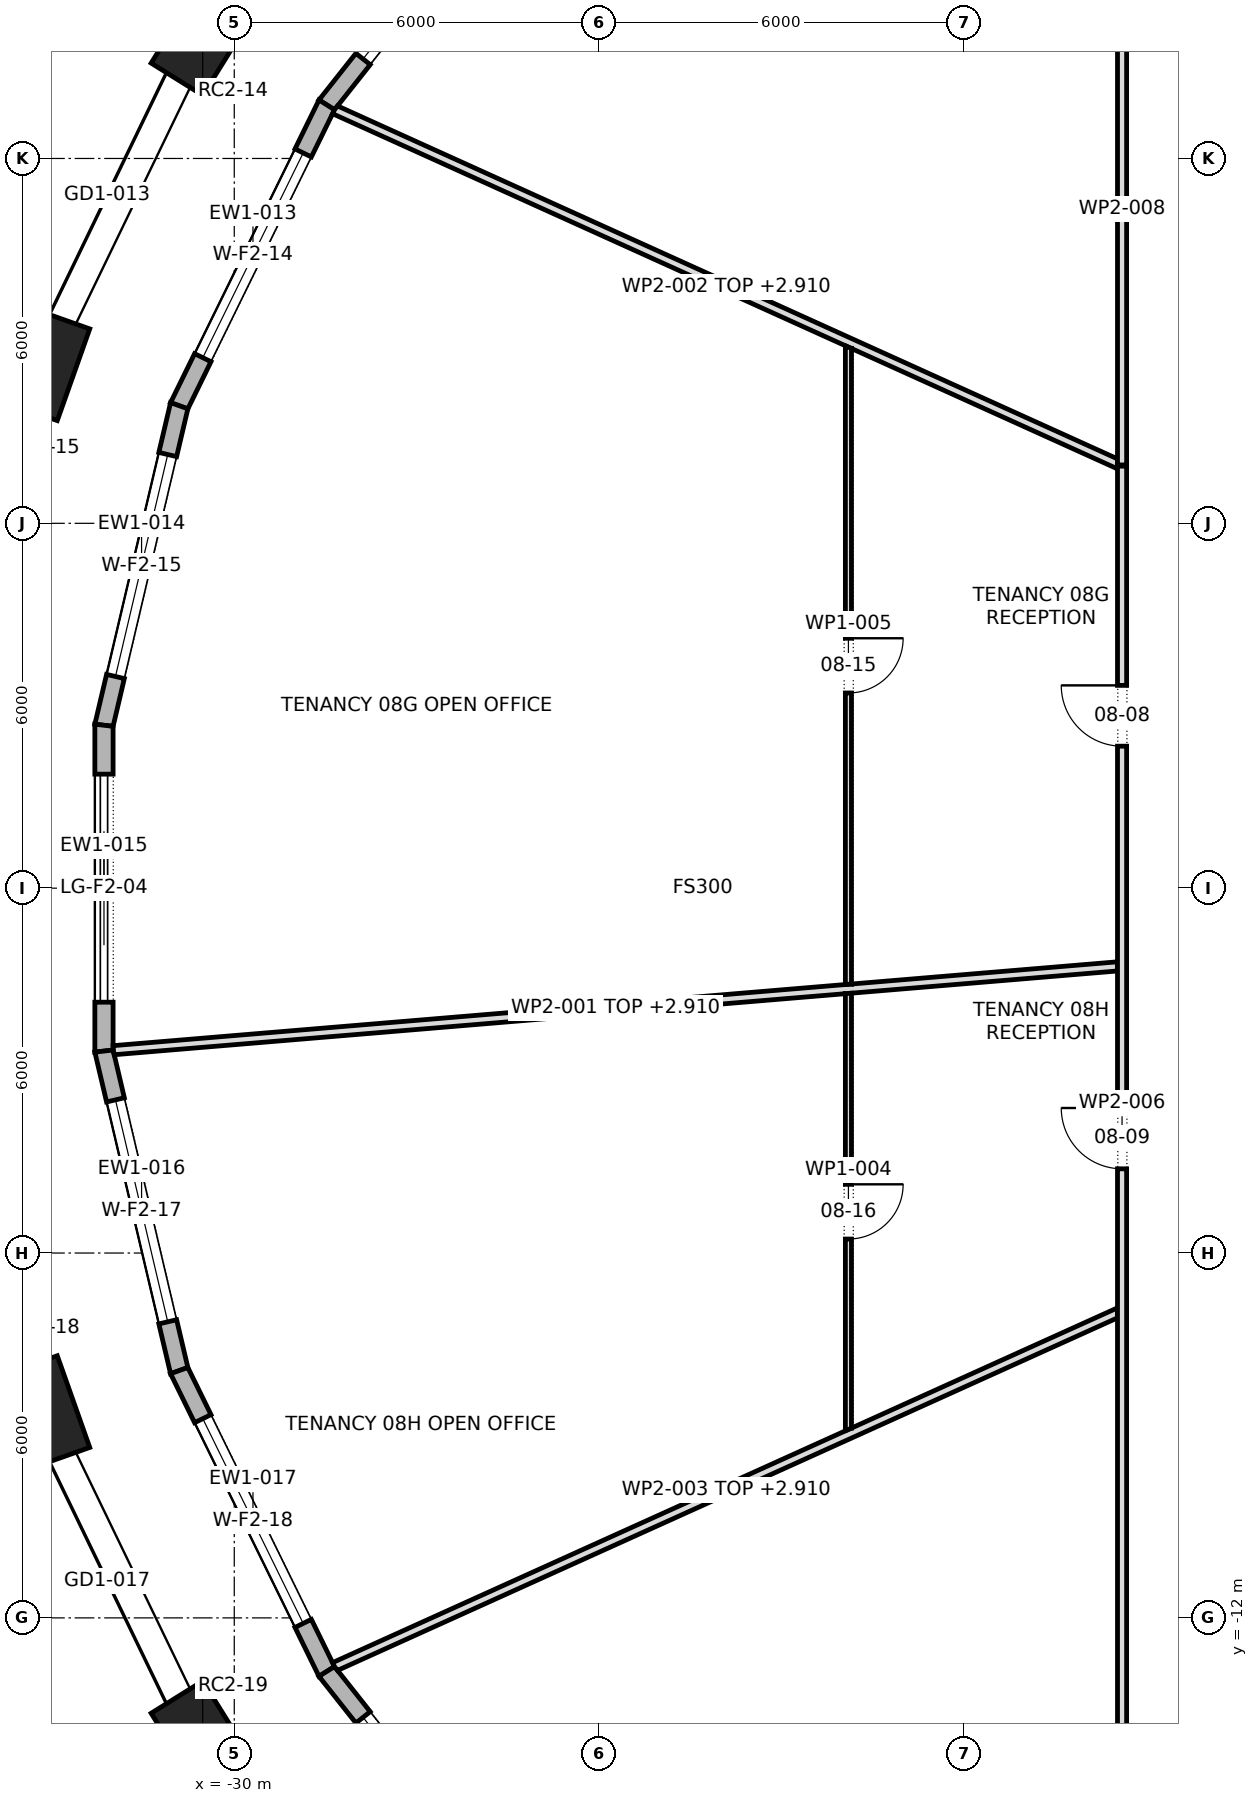
"""IFC4 building model, lengths in metres.
Left out: names, types, materials, properties, quantities, classifications, styles, units other than length and angle.
Written with IfcOpenShell. Run it as: python <this file> out.ifc"""

import sys

from ifc_helpers import new_model, si_unit, direction, frame, frame_2d, origin, origin_2d, place, context, subcontext, project, spatial, polyline, rectangle, outline, extrude, element, fill, save


model = new_model("IFC4")
c1 = context("Model", 3, precision=1e-05, world=origin(), true_north=direction((0.0, 1.0)))
c2 = subcontext(c1, "Body", "Model", "MODEL_VIEW")
j1 = project(units=[si_unit("LENGTHUNIT", "METRE"), si_unit("PLANEANGLEUNIT", "RADIAN")], contexts=[c1])
p1 = place(None, origin())
s1 = spatial("IfcSite", under=j1, at=p1, CompositionType="ELEMENT")
p2 = place(p1, origin())
s2 = spatial("IfcBuilding", under=s1, at=p2, CompositionType="ELEMENT")
p3 = place(p2, frame((0.0, 0.0, 125.5)))
s3 = spatial("IfcBuildingStorey", under=s2, at=p3, CompositionType="ELEMENT", Elevation=125.5)
for number, where, z_axis, x_axis in (
    (1, (-30.519, 13.982, 0.0), (0.0, 0.0, 1.0), (-0.529, -0.849, 0.0)),
    (2, (-33.115, 8.61, 0.0), (0.0, 0.0, 1.0), (-0.334, -0.943, 0.0)),
    (3, (-33.115, -8.61, 0.0), (0.0, 0.0, 1.0), (0.334, -0.943, 0.0)),
    (4, (-30.519, -13.982, 0.0), (0.0, 0.0, 1.0), (0.529, -0.849, 0.0)),
):
    element("IfcColumn", number, at=place(p3, frame(where, z_axis=z_axis, x_axis=x_axis)), inside=s3, PredefinedType="COLUMN", context=c2, shape_type="SweptSolid", body=[
        extrude(rectangle(XDim=1.6, YDim=1.0, at=origin_2d()), origin(), (0.0, 0.0, 1.0), 4.2),
    ])
p4 = place(p3, frame((-24.958, 17.332, 0.0), z_axis=(0.0, 0.0, 1.0), x_axis=(-0.62038332391, -0.784298751379, 0.0)))
e5 = element("IfcWall", 5, at=p4, inside=s3, PredefinedType="STANDARD", context=c2, shape_type="SweptSolid", body=[
    extrude(outline(polyline([(-0.015, -0.15), (5.691, -0.15), (5.659, 0.15), (0.015, 0.15), (-0.015, -0.15)])), origin(), (0.0, 0.0, 1.0), 3.9),
])
p5 = place(p4, frame((0.962, 0.0, 0.6)))
e6 = element("IfcOpeningElement", 6, at=p5, cuts=e5, PredefinedType="OPENING", context=c2, shape_type="SweptSolid", body=[
    extrude(rectangle(XDim=3.75, YDim=2.85, at=frame_2d((1.875, 1.425))), frame((0.0, 0.162, 0.0), z_axis=(0.0, -1.0, 0.0), x_axis=(1.0, 0.0, 0.0)), (0.0, 0.0, 1.0), 0.324),
])
p6 = place(p3, frame((-28.479, 12.881, 0.0), z_axis=(0.0, 0.0, 1.0), x_axis=(-0.440306401535, -0.897847577692, 0.0)))
e7 = element("IfcWall", 7, at=p6, inside=s3, PredefinedType="STANDARD", context=c2, shape_type="SweptSolid", body=[
    extrude(outline(polyline([(-0.016, -0.15), (5.527, -0.15), (5.494, 0.15), (0.016, 0.15), (-0.016, -0.15)])), origin(), (0.0, 0.0, 1.0), 3.9),
])
p7 = place(p6, frame((0.88, 0.0, 0.6)))
e8 = element("IfcOpeningElement", 8, at=p7, cuts=e7, PredefinedType="OPENING", context=c2, shape_type="SweptSolid", body=[
    extrude(rectangle(XDim=3.75, YDim=2.85, at=frame_2d((1.875, 1.425))), frame((0.0, 0.162, 0.0), z_axis=(0.0, -1.0, 0.0), x_axis=(1.0, 0.0, 0.0)), (0.0, 0.0, 1.0), 0.324),
])
p8 = place(p3, frame((-30.905, 7.934, 0.0), z_axis=(0.0, 0.0, 1.0), x_axis=(-0.229200658045, -0.973379195561, 0.0)))
e9 = element("IfcWall", 9, at=p8, inside=s3, PredefinedType="STANDARD", context=c2, shape_type="SweptSolid", body=[
    extrude(outline(polyline([(-0.017, -0.15), (5.416, -0.15), (5.381, 0.15), (0.017, 0.15), (-0.017, -0.15)])), origin(), (0.0, 0.0, 1.0), 3.9),
])
p9 = place(p8, frame((0.824, 0.0, 0.6)))
e10 = element("IfcOpeningElement", 10, at=p9, cuts=e9, PredefinedType="OPENING", context=c2, shape_type="SweptSolid", body=[
    extrude(rectangle(XDim=3.75, YDim=2.85, at=frame_2d((1.875, 1.425))), frame((0.0, 0.162, 0.0), z_axis=(0.0, -1.0, 0.0), x_axis=(1.0, 0.0, 0.0)), (0.0, 0.0, 1.0), 0.324),
])
p10 = place(p3, frame((-32.143, 2.679, 0.0), z_axis=(0.0, 0.0, 1.0), x_axis=(0.0, -1.0, 0.0)))
e11 = element("IfcWall", 11, at=p10, inside=s3, PredefinedType="STANDARD", context=c2, shape_type="SweptSolid", body=[
    extrude(outline(polyline([(-0.017, -0.15), (5.375, -0.15), (5.341, 0.15), (0.017, 0.15), (-0.017, -0.15)])), origin(), (0.0, 0.0, 1.0), 3.9),
])
p11 = place(p10, frame((0.804, 0.0, 0.0)))
e12 = element("IfcOpeningElement", 12, at=p11, cuts=e11, PredefinedType="OPENING", context=c2, shape_type="SweptSolid", body=[
    extrude(rectangle(XDim=3.75, YDim=3.45, at=frame_2d((1.875, 1.725))), frame((0.0, 0.162, 0.0), z_axis=(0.0, -1.0, 0.0), x_axis=(1.0, 0.0, 0.0)), (0.0, 0.0, 1.0), 0.324),
])
p12 = place(p3, frame((-32.143, -2.679, 0.0), z_axis=(0.0, 0.0, 1.0), x_axis=(0.229200658045, -0.973379195561, 0.0)))
e13 = element("IfcWall", 13, at=p12, inside=s3, PredefinedType="STANDARD", context=c2, shape_type="SweptSolid", body=[
    extrude(outline(polyline([(-0.017, -0.15), (5.415, -0.15), (5.382, 0.15), (0.017, 0.15), (-0.017, -0.15)])), origin(), (0.0, 0.0, 1.0), 3.9),
])
p13 = place(p12, frame((0.824, 0.0, 0.6)))
e14 = element("IfcOpeningElement", 14, at=p13, cuts=e13, PredefinedType="OPENING", context=c2, shape_type="SweptSolid", body=[
    extrude(rectangle(XDim=3.75, YDim=2.85, at=frame_2d((1.875, 1.425))), frame((0.0, 0.162, 0.0), z_axis=(0.0, -1.0, 0.0), x_axis=(1.0, 0.0, 0.0)), (0.0, 0.0, 1.0), 0.324),
])
p14 = place(p3, frame((-30.905, -7.934, 0.0), z_axis=(0.0, 0.0, 1.0), x_axis=(0.440306401535, -0.897847577692, 0.0)))
e15 = element("IfcWall", 15, at=p14, inside=s3, PredefinedType="STANDARD", context=c2, shape_type="SweptSolid", body=[
    extrude(outline(polyline([(-0.017, -0.15), (5.527, -0.15), (5.494, 0.15), (0.017, 0.15), (-0.017, -0.15)])), origin(), (0.0, 0.0, 1.0), 3.9),
])
p15 = place(p14, frame((0.88, 0.0, 0.6)))
e16 = element("IfcOpeningElement", 16, at=p15, cuts=e15, PredefinedType="OPENING", context=c2, shape_type="SweptSolid", body=[
    extrude(rectangle(XDim=3.75, YDim=2.85, at=frame_2d((1.875, 1.425))), frame((0.0, 0.162, 0.0), z_axis=(0.0, -1.0, 0.0), x_axis=(1.0, 0.0, 0.0)), (0.0, 0.0, 1.0), 0.324),
])
p16 = place(p3, frame((-28.479, -12.881, 0.0), z_axis=(0.0, 0.0, 1.0), x_axis=(0.62038332391, -0.784298751379, 0.0)))
e17 = element("IfcWall", 17, at=p16, inside=s3, PredefinedType="STANDARD", context=c2, shape_type="SweptSolid", body=[
    extrude(outline(polyline([(-0.016, -0.15), (5.69, -0.15), (5.66, 0.15), (0.016, 0.15), (-0.016, -0.15)])), origin(), (0.0, 0.0, 1.0), 3.9),
])
p17 = place(p16, frame((0.962, 0.0, 0.6)))
e18 = element("IfcOpeningElement", 18, at=p17, cuts=e17, PredefinedType="OPENING", context=c2, shape_type="SweptSolid", body=[
    extrude(rectangle(XDim=3.75, YDim=2.85, at=frame_2d((1.875, 1.425))), frame((0.0, 0.162, 0.0), z_axis=(0.0, -1.0, 0.0), x_axis=(1.0, 0.0, 0.0)), (0.0, 0.0, 1.0), 0.324),
])
p18 = place(p3, frame((-31.986, -2.665, 0.0), z_axis=(0.0, 0.0, 1.0), x_axis=(0.996533353756, 0.083194199634, 0.0)))
e19 = element("IfcWall", 19, at=p18, inside=s3, PredefinedType="PARTITIONING", context=c2, shape_type="SweptSolid", body=[
    extrude(outline(polyline([(0.006, -0.075), (1.729, -0.075), (3.453, -0.075), (5.177, -0.075), (6.901, -0.075), (8.625, -0.075), (10.348, -0.075), (12.072, -0.075), (12.072, -0.075), (12.074, -0.075), (13.57, -0.075), (15.066, -0.075), (16.562, -0.075), (16.574, 0.068), (16.574, 0.075), (15.111, 0.075), (13.648, 0.075), (12.185, 0.075), (12.185, 0.074), (12.172, 0.075), (10.433, 0.075), (8.694, 0.075), (6.955, 0.075), (5.216, 0.075), (3.478, 0.075), (1.739, 0.075), (0.0, 0.075), (0.0, -0.036), (0.006, -0.075)])), origin(), (0.0, 0.0, 1.0), 2.91),
])
p19 = place(p3, frame((-28.352, 12.804, 0.0), z_axis=(0.0, 0.0, 1.0), x_axis=(0.91107802929, -0.412233943951, 0.0)))
e20 = element("IfcWall", 20, at=p19, inside=s3, PredefinedType="PARTITIONING", context=c2, shape_type="SweptSolid", body=[
    extrude(outline(polyline([(0.0, -0.075), (1.872, -0.075), (3.744, -0.075), (5.616, -0.075), (7.488, -0.075), (9.36, -0.075), (9.365, -0.073), (9.365, -0.075), (10.966, -0.075), (12.567, -0.075), (14.167, -0.075), (14.167, -0.075), (14.145, -0.025), (14.1, 0.075), (12.34, 0.075), (10.58, 0.075), (8.82, 0.075), (7.06, 0.075), (5.301, 0.075), (3.541, 0.075), (1.781, 0.075), (0.021, 0.075), (0.002, -0.003), (0.0, -0.059), (0.0, -0.075)])), origin(), (0.0, 0.0, 1.0), 2.91),
])
p20 = place(p3, frame((-28.352, -12.804, 0.0), z_axis=(0.0, 0.0, 1.0), x_axis=(0.911239169411, 0.41187762276, 0.0)))
e21 = element("IfcWall", 21, at=p20, inside=s3, PredefinedType="PARTITIONING", context=c2, shape_type="SweptSolid", body=[
    extrude(outline(polyline([(0.022, -0.075), (1.781, -0.075), (3.541, -0.075), (5.3, -0.075), (7.06, -0.075), (8.819, -0.075), (10.579, -0.075), (12.338, -0.075), (14.098, -0.075), (14.166, 0.075), (12.565, 0.075), (10.965, 0.075), (9.364, 0.075), (9.364, 0.074), (9.362, 0.075), (7.49, 0.075), (5.617, 0.075), (3.745, 0.075), (1.873, 0.075), (0.0, 0.075), (0.0, 0.074), (0.002, 0.003), (0.022, -0.075)])), origin(), (0.0, 0.0, 1.0), 2.91),
])
p21 = place(p3, frame((-19.9, -8.924, 0.0), z_axis=(0.0, 0.0, 1.0), x_axis=(0.0, 1.0, 0.0)))
e22 = element("IfcWall", 22, at=p21, inside=s3, PredefinedType="PARTITIONING", context=c2, shape_type="SweptSolid", body=[
    extrude(outline(polyline([(7.197, -0.05), (7.197, -0.046), (7.189, 0.05), (5.392, 0.05), (3.594, 0.05), (1.797, 0.05), (0.0, 0.05), (0.0, 0.05), (0.045, -0.05), (1.833, -0.05), (3.621, -0.05), (5.409, -0.05), (7.197, -0.05)])), origin(), (0.0, 0.0, 1.0), 3.9),
])
p22 = place(p21, frame((3.154, 0.0, 0.0)))
e23 = element("IfcOpeningElement", 23, at=p22, cuts=e22, PredefinedType="OPENING", context=c2, shape_type="SweptSolid", body=[
    extrude(rectangle(XDim=0.9, YDim=2.1, at=frame_2d((0.45, 1.05))), frame((0.0, 0.062, 0.0), z_axis=(0.0, -1.0, 0.0), x_axis=(1.0, 0.0, 0.0)), (0.0, 0.0, 1.0), 0.124),
])
p23 = place(p3, frame((-19.9, -1.584, 0.0), z_axis=(0.0, 0.0, 1.0), x_axis=(0.0, 1.0, 0.0)))
e24 = element("IfcWall", 24, at=p23, inside=s3, PredefinedType="PARTITIONING", context=c2, shape_type="SweptSolid", body=[
    extrude(outline(polyline([(0.008, -0.05), (1.75, -0.05), (3.492, -0.05), (5.234, -0.05), (6.976, -0.05), (8.718, -0.05), (10.459, -0.05), (10.504, 0.049), (10.504, 0.05), (8.754, 0.05), (7.003, 0.05), (5.252, 0.05), (3.501, 0.05), (1.751, 0.05), (0.0, 0.05), (0.0, 0.048), (0.008, -0.05)])), origin(), (0.0, 0.0, 1.0), 3.9),
])
p24 = place(p23, frame((4.794, 0.0, 0.0)))
e25 = element("IfcOpeningElement", 25, at=p24, cuts=e24, PredefinedType="OPENING", context=c2, shape_type="SweptSolid", body=[
    extrude(rectangle(XDim=0.9, YDim=2.1, at=frame_2d((0.45, 1.05))), frame((0.0, 0.062, 0.0), z_axis=(0.0, -1.0, 0.0), x_axis=(1.0, 0.0, 0.0)), (0.0, 0.0, 1.0), 0.124),
])
p25 = place(p3, frame((-15.4, -15.475, 0.0), z_axis=(0.0, 0.0, 1.0), x_axis=(0.0, 1.0, 0.0)))
e26 = element("IfcWall", 26, at=p25, inside=s3, PredefinedType="PARTITIONING", context=c2, shape_type="SweptSolid", body=[
    extrude(outline(polyline([(22.425, 0.075), (20.556, 0.075), (18.688, 0.075), (16.819, 0.075), (14.95, 0.075), (13.081, 0.075), (11.213, 0.075), (9.344, 0.075), (7.475, 0.075), (5.606, 0.075), (3.738, 0.075), (1.869, 0.075), (0.0, 0.075), (0.15, -0.075), (2.006, -0.075), (3.863, -0.075), (5.719, -0.075), (7.575, -0.075), (9.431, -0.075), (11.288, -0.075), (13.144, -0.075), (15.0, -0.075), (16.856, -0.075), (18.713, -0.075), (20.569, -0.075), (22.425, -0.075), (22.425, 0.075)])), origin(), (0.0, 0.0, 1.0), 3.9),
])
p26 = place(p25, frame((17.81, 0.0, 0.0)))
e27 = element("IfcOpeningElement", 27, at=p26, cuts=e26, PredefinedType="OPENING", context=c2, shape_type="SweptSolid", body=[
    extrude(rectangle(XDim=1.0, YDim=2.1, at=frame_2d((0.5, 1.05))), frame((0.0, 0.087, 0.0), z_axis=(0.0, -1.0, 0.0), x_axis=(1.0, 0.0, 0.0)), (0.0, 0.0, 1.0), 0.174),
])
p27 = place(p25, frame((10.86, 0.0, 0.0)))
e28 = element("IfcOpeningElement", 28, at=p27, cuts=e26, PredefinedType="OPENING", context=c2, shape_type="SweptSolid", body=[
    extrude(rectangle(XDim=1.0, YDim=2.1, at=frame_2d((0.5, 1.05))), frame((0.0, 0.087, 0.0), z_axis=(0.0, -1.0, 0.0), x_axis=(1.0, 0.0, 0.0)), (0.0, 0.0, 1.0), 0.174),
])
p28 = place(p3, frame((-15.4, 6.95, 0.0), z_axis=(0.0, 0.0, 1.0), x_axis=(0.0, 1.0, 0.0)))
e29 = element("IfcWall", 29, at=p28, inside=s3, PredefinedType="PARTITIONING", context=c2, shape_type="SweptSolid", body=[
    extrude(outline(polyline([(0.0, -0.075), (1.675, -0.075), (3.35, -0.075), (5.025, -0.075), (6.7, -0.075), (8.375, -0.075), (8.525, 0.075), (6.82, 0.075), (5.115, 0.075), (3.41, 0.075), (1.705, 0.075), (0.0, 0.075), (0.0, -0.075)])), origin(), (0.0, 0.0, 1.0), 3.9),
])
p29 = place(p5, origin())
e30 = element("IfcWindow", 30, at=p29, inside=s3, PartitioningType="TRIPLE_PANEL_VERTICAL", PredefinedType="WINDOW", context=c2, shape_type="SweptSolid", body=[
    extrude(rectangle(XDim=3.75, YDim=2.85, at=frame_2d((1.875, 1.425))), frame((0.0, 0.03, 0.0), z_axis=(0.0, -1.0, 0.0), x_axis=(1.0, 0.0, 0.0)), (0.0, 0.0, 1.0), 0.06),
])
fill(e6, e30)
p30 = place(p7, origin())
e31 = element("IfcWindow", 31, at=p30, inside=s3, PartitioningType="TRIPLE_PANEL_VERTICAL", PredefinedType="WINDOW", context=c2, shape_type="SweptSolid", body=[
    extrude(rectangle(XDim=3.75, YDim=2.85, at=frame_2d((1.875, 1.425))), frame((0.0, 0.03, 0.0), z_axis=(0.0, -1.0, 0.0), x_axis=(1.0, 0.0, 0.0)), (0.0, 0.0, 1.0), 0.06),
])
fill(e8, e31)
p31 = place(p9, origin())
e32 = element("IfcWindow", 32, at=p31, inside=s3, PartitioningType="TRIPLE_PANEL_VERTICAL", PredefinedType="WINDOW", context=c2, shape_type="SweptSolid", body=[
    extrude(rectangle(XDim=3.75, YDim=2.85, at=frame_2d((1.875, 1.425))), frame((0.0, 0.03, 0.0), z_axis=(0.0, -1.0, 0.0), x_axis=(1.0, 0.0, 0.0)), (0.0, 0.0, 1.0), 0.06),
])
fill(e10, e32)
p32 = place(p11, origin())
e33 = element("IfcDoor", 33, at=p32, inside=s3, OperationType="DOUBLE_DOOR_SLIDING", PredefinedType="DOOR", context=c2, shape_type="SweptSolid", body=[
    extrude(rectangle(XDim=3.75, YDim=3.45, at=frame_2d((1.875, 1.725))), frame((0.0, 0.025, 0.0), z_axis=(0.0, -1.0, 0.0), x_axis=(1.0, 0.0, 0.0)), (0.0, 0.0, 1.0), 0.05),
])
fill(e12, e33)
p33 = place(p13, origin())
e34 = element("IfcWindow", 34, at=p33, inside=s3, PartitioningType="TRIPLE_PANEL_VERTICAL", PredefinedType="WINDOW", context=c2, shape_type="SweptSolid", body=[
    extrude(rectangle(XDim=3.75, YDim=2.85, at=frame_2d((1.875, 1.425))), frame((0.0, 0.03, 0.0), z_axis=(0.0, -1.0, 0.0), x_axis=(1.0, 0.0, 0.0)), (0.0, 0.0, 1.0), 0.06),
])
fill(e14, e34)
p34 = place(p15, origin())
e35 = element("IfcWindow", 35, at=p34, inside=s3, PartitioningType="TRIPLE_PANEL_VERTICAL", PredefinedType="WINDOW", context=c2, shape_type="SweptSolid", body=[
    extrude(rectangle(XDim=3.75, YDim=2.85, at=frame_2d((1.875, 1.425))), frame((0.0, 0.03, 0.0), z_axis=(0.0, -1.0, 0.0), x_axis=(1.0, 0.0, 0.0)), (0.0, 0.0, 1.0), 0.06),
])
fill(e16, e35)
p35 = place(p17, origin())
e36 = element("IfcWindow", 36, at=p35, inside=s3, PartitioningType="TRIPLE_PANEL_VERTICAL", PredefinedType="WINDOW", context=c2, shape_type="SweptSolid", body=[
    extrude(rectangle(XDim=3.75, YDim=2.85, at=frame_2d((1.875, 1.425))), frame((0.0, 0.03, 0.0), z_axis=(0.0, -1.0, 0.0), x_axis=(1.0, 0.0, 0.0)), (0.0, 0.0, 1.0), 0.06),
])
fill(e18, e36)
p36 = place(p26, origin())
e37 = element("IfcDoor", 37, at=p36, inside=s3, OperationType="SINGLE_SWING_LEFT", PredefinedType="DOOR", context=c2, shape_type="SweptSolid", body=[
    extrude(rectangle(XDim=1.0, YDim=2.1, at=frame_2d((0.5, 1.05))), frame((0.0, 0.025, 0.0), z_axis=(0.0, -1.0, 0.0), x_axis=(1.0, 0.0, 0.0)), (0.0, 0.0, 1.0), 0.05),
])
fill(e27, e37)
p37 = place(p27, origin())
e38 = element("IfcDoor", 38, at=p37, inside=s3, OperationType="SINGLE_SWING_LEFT", PredefinedType="DOOR", context=c2, shape_type="SweptSolid", body=[
    extrude(rectangle(XDim=1.0, YDim=2.1, at=frame_2d((0.5, 1.05))), frame((0.0, 0.025, 0.0), z_axis=(0.0, -1.0, 0.0), x_axis=(1.0, 0.0, 0.0)), (0.0, 0.0, 1.0), 0.05),
])
fill(e28, e38)
p38 = place(p24, frame((0.9, 0.0, 0.0), z_axis=(0.0, 0.0, 1.0), x_axis=(-1.0, 0.0, 0.0)))
e39 = element("IfcDoor", 39, at=p38, inside=s3, OperationType="SINGLE_SWING_RIGHT", PredefinedType="DOOR", context=c2, shape_type="SweptSolid", body=[
    extrude(rectangle(XDim=0.9, YDim=2.1, at=frame_2d((0.45, 1.05))), frame((0.0, 0.025, 0.0), z_axis=(0.0, -1.0, 0.0), x_axis=(1.0, 0.0, 0.0)), (0.0, 0.0, 1.0), 0.05),
])
fill(e25, e39)
p39 = place(p22, frame((0.9, 0.0, 0.0), z_axis=(0.0, 0.0, 1.0), x_axis=(-1.0, 0.0, 0.0)))
e40 = element("IfcDoor", 40, at=p39, inside=s3, OperationType="SINGLE_SWING_RIGHT", PredefinedType="DOOR", context=c2, shape_type="SweptSolid", body=[
    extrude(rectangle(XDim=0.9, YDim=2.1, at=frame_2d((0.45, 1.05))), frame((0.0, 0.025, 0.0), z_axis=(0.0, -1.0, 0.0), x_axis=(1.0, 0.0, 0.0)), (0.0, 0.0, 1.0), 0.05),
])
fill(e23, e40)
save(model, sys.argv[1])
